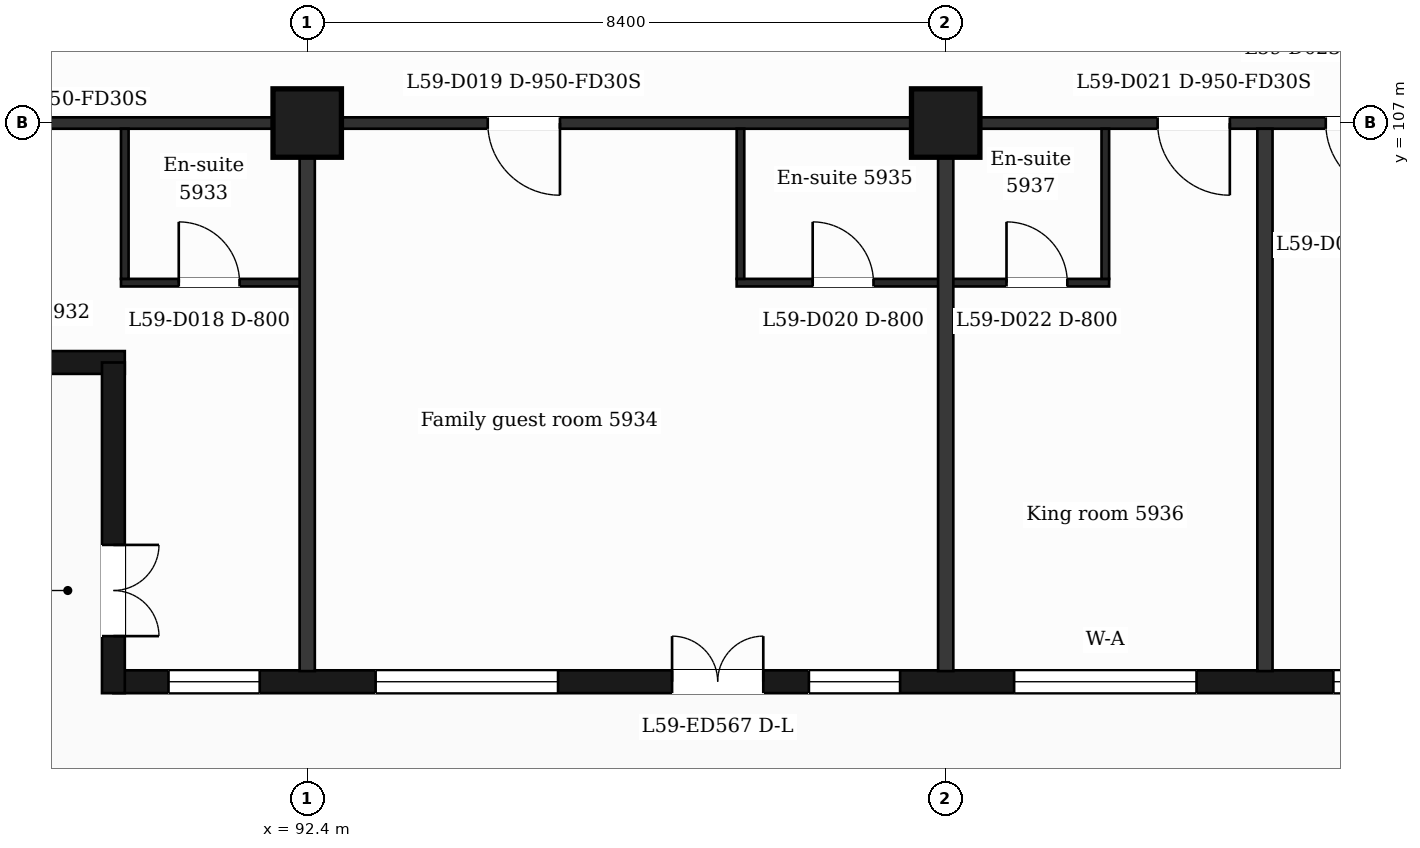
"""IFC4 building model, lengths in metres.
Left out: names, types, materials, properties, quantities, classifications, styles, units other than length and angle.
Written with IfcOpenShell. Run it as: python <this file> out.ifc"""

import sys

from ifc_helpers import new_model, si_unit, direction, frame, frame_2d, origin, origin_2d, place, context, subcontext, project, spatial, rectangle, extrude, element, fill, save


model = new_model("IFC4")
c1 = context("Model", 3, precision=1e-05, world=origin(), true_north=direction((0.0, 1.0)))
c2 = subcontext(c1, "Body", "Model", "MODEL_VIEW")
j1 = project(units=[si_unit("LENGTHUNIT", "METRE"), si_unit("PLANEANGLEUNIT", "RADIAN")], contexts=[c1])
p1 = place(None, origin())
s1 = spatial("IfcSite", under=j1, at=p1, CompositionType="ELEMENT")
p2 = place(p1, origin())
s2 = spatial("IfcBuilding", under=s1, at=p2, CompositionType="ELEMENT")
p3 = place(p2, frame((0.0, 0.0, 242.9)))
s3 = spatial("IfcBuildingStorey", under=s2, at=p3, CompositionType="ELEMENT", Elevation=242.9)
for number, where, z_axis, x_axis in (
    (1, (92.4, 107.0, 0.0), (0.0, 0.0, 1.0), (1.0, 0.0, 0.0)),
    (2, (100.8, 107.0, 0.0), (0.0, 0.0, 1.0), (1.0, 0.0, 0.0)),
):
    element("IfcColumn", number, at=place(p3, frame(where, z_axis=z_axis, x_axis=x_axis)), inside=s3, PredefinedType="COLUMN", context=c2, shape_type="SweptSolid", body=[
        extrude(rectangle(XDim=0.9, YDim=0.9, at=origin_2d()), origin(), (0.0, 0.0, 1.0), 3.7),
    ])
p4 = place(p3, frame((89.85, 99.65, 0.0), z_axis=(0.0, 0.0, 1.0), x_axis=(1.0, 0.0, 0.0)))
e3 = element("IfcWall", 3, at=p4, inside=s3, PredefinedType="SOLIDWALL", context=c2, shape_type="SweptSolid", body=[
    extrude(rectangle(XDim=47.25, YDim=0.3, at=frame_2d((23.625, 0.0))), origin(), (0.0, 0.0, 1.0), 3.2),
])
p5 = place(p4, frame((0.725, 0.0, 0.9)))
e4 = element("IfcOpeningElement", 4, at=p5, cuts=e3, PredefinedType="OPENING", context=c2, shape_type="SweptSolid", body=[
    extrude(rectangle(XDim=1.2, YDim=2.1, at=frame_2d((0.6, 1.05))), frame((0.0, 0.16, 0.0), z_axis=(0.0, -1.0, 0.0), x_axis=(1.0, 0.0, 0.0)), (0.0, 0.0, 1.0), 0.32),
])
p6 = place(p4, frame((3.45, 0.0, 0.9)))
e5 = element("IfcOpeningElement", 5, at=p6, cuts=e3, PredefinedType="OPENING", context=c2, shape_type="SweptSolid", body=[
    extrude(rectangle(XDim=2.4, YDim=2.1, at=frame_2d((1.2, 1.05))), frame((0.0, 0.16, 0.0), z_axis=(0.0, -1.0, 0.0), x_axis=(1.0, 0.0, 0.0)), (0.0, 0.0, 1.0), 0.32),
])
p7 = place(p4, frame((7.35, 0.0, 0.0)))
e6 = element("IfcOpeningElement", 6, at=p7, cuts=e3, PredefinedType="OPENING", context=c2, shape_type="SweptSolid", body=[
    extrude(rectangle(XDim=1.2, YDim=2.4, at=frame_2d((0.6, 1.2))), frame((0.0, 0.16, 0.0), z_axis=(0.0, -1.0, 0.0), x_axis=(1.0, 0.0, 0.0)), (0.0, 0.0, 1.0), 0.32),
])
p8 = place(p4, frame((9.15, 0.0, 0.9)))
e7 = element("IfcOpeningElement", 7, at=p8, cuts=e3, PredefinedType="OPENING", context=c2, shape_type="SweptSolid", body=[
    extrude(rectangle(XDim=1.2, YDim=2.1, at=frame_2d((0.6, 1.05))), frame((0.0, 0.16, 0.0), z_axis=(0.0, -1.0, 0.0), x_axis=(1.0, 0.0, 0.0)), (0.0, 0.0, 1.0), 0.32),
])
p9 = place(p4, frame((11.85, 0.0, 0.9)))
e8 = element("IfcOpeningElement", 8, at=p9, cuts=e3, PredefinedType="OPENING", context=c2, shape_type="SweptSolid", body=[
    extrude(rectangle(XDim=2.4, YDim=2.1, at=frame_2d((1.2, 1.05))), frame((0.0, 0.16, 0.0), z_axis=(0.0, -1.0, 0.0), x_axis=(1.0, 0.0, 0.0)), (0.0, 0.0, 1.0), 0.32),
])
p10 = place(p4, frame((16.05, 0.0, 0.9)))
e9 = element("IfcOpeningElement", 9, at=p10, cuts=e3, PredefinedType="OPENING", context=c2, shape_type="SweptSolid", body=[
    extrude(rectangle(XDim=2.4, YDim=2.1, at=frame_2d((1.2, 1.05))), frame((0.0, 0.16, 0.0), z_axis=(0.0, -1.0, 0.0), x_axis=(1.0, 0.0, 0.0)), (0.0, 0.0, 1.0), 0.32),
])
p11 = place(p4, frame((20.85, 0.0, 0.9)))
e10 = element("IfcOpeningElement", 10, at=p11, cuts=e3, PredefinedType="OPENING", context=c2, shape_type="SweptSolid", body=[
    extrude(rectangle(XDim=1.2, YDim=2.1, at=frame_2d((0.6, 1.05))), frame((0.0, 0.16, 0.0), z_axis=(0.0, -1.0, 0.0), x_axis=(1.0, 0.0, 0.0)), (0.0, 0.0, 1.0), 0.32),
])
p12 = place(p4, frame((25.05, 0.0, 0.9)))
e11 = element("IfcOpeningElement", 11, at=p12, cuts=e3, PredefinedType="OPENING", context=c2, shape_type="SweptSolid", body=[
    extrude(rectangle(XDim=1.2, YDim=2.1, at=frame_2d((0.6, 1.05))), frame((0.0, 0.16, 0.0), z_axis=(0.0, -1.0, 0.0), x_axis=(1.0, 0.0, 0.0)), (0.0, 0.0, 1.0), 0.32),
])
p13 = place(p4, frame((28.65, 0.0, 0.9)))
e12 = element("IfcOpeningElement", 12, at=p13, cuts=e3, PredefinedType="OPENING", context=c2, shape_type="SweptSolid", body=[
    extrude(rectangle(XDim=2.4, YDim=2.1, at=frame_2d((1.2, 1.05))), frame((0.0, 0.16, 0.0), z_axis=(0.0, -1.0, 0.0), x_axis=(1.0, 0.0, 0.0)), (0.0, 0.0, 1.0), 0.32),
])
p14 = place(p4, frame((32.85, 0.0, 0.9)))
e13 = element("IfcOpeningElement", 13, at=p14, cuts=e3, PredefinedType="OPENING", context=c2, shape_type="SweptSolid", body=[
    extrude(rectangle(XDim=2.4, YDim=2.1, at=frame_2d((1.2, 1.05))), frame((0.0, 0.16, 0.0), z_axis=(0.0, -1.0, 0.0), x_axis=(1.0, 0.0, 0.0)), (0.0, 0.0, 1.0), 0.32),
])
p15 = place(p4, frame((37.05, 0.0, 0.9)))
e14 = element("IfcOpeningElement", 14, at=p15, cuts=e3, PredefinedType="OPENING", context=c2, shape_type="SweptSolid", body=[
    extrude(rectangle(XDim=2.4, YDim=2.1, at=frame_2d((1.2, 1.05))), frame((0.0, 0.16, 0.0), z_axis=(0.0, -1.0, 0.0), x_axis=(1.0, 0.0, 0.0)), (0.0, 0.0, 1.0), 0.32),
])
p16 = place(p4, frame((41.25, 0.0, 0.9)))
e15 = element("IfcOpeningElement", 15, at=p16, cuts=e3, PredefinedType="OPENING", context=c2, shape_type="SweptSolid", body=[
    extrude(rectangle(XDim=2.4, YDim=2.1, at=frame_2d((1.2, 1.05))), frame((0.0, 0.16, 0.0), z_axis=(0.0, -1.0, 0.0), x_axis=(1.0, 0.0, 0.0)), (0.0, 0.0, 1.0), 0.32),
])
p17 = place(p4, frame((45.25, 0.0, 0.9)))
e16 = element("IfcOpeningElement", 16, at=p17, cuts=e3, PredefinedType="OPENING", context=c2, shape_type="SweptSolid", body=[
    extrude(rectangle(XDim=1.2, YDim=2.1, at=frame_2d((0.6, 1.05))), frame((0.0, 0.16, 0.0), z_axis=(0.0, -1.0, 0.0), x_axis=(1.0, 0.0, 0.0)), (0.0, 0.0, 1.0), 0.32),
])
p18 = place(p3, frame((86.452, 103.85, 0.0), z_axis=(0.0, 0.0, 1.0), x_axis=(1.0, 0.0, 0.0)))
e17 = element("IfcWall", 17, at=p18, inside=s3, PredefinedType="SOLIDWALL", context=c2, shape_type="SweptSolid", body=[
    extrude(rectangle(XDim=3.548, YDim=0.3, at=frame_2d((1.774, 0.0))), origin(), (0.0, 0.0, 1.0), 3.2),
])
p19 = place(p3, frame((89.85, 103.85, 0.0), z_axis=(0.0, 0.0, 1.0), x_axis=(0.0, -1.0, 0.0)))
e18 = element("IfcWall", 18, at=p19, inside=s3, PredefinedType="SOLIDWALL", context=c2, shape_type="SweptSolid", body=[
    extrude(rectangle(XDim=4.35, YDim=0.3, at=frame_2d((2.175, 0.0))), origin(), (0.0, 0.0, 1.0), 3.2),
])
p20 = place(p19, frame((2.4, 0.0, 0.0)))
e19 = element("IfcOpeningElement", 19, at=p20, cuts=e18, PredefinedType="OPENING", context=c2, shape_type="SweptSolid", body=[
    extrude(rectangle(XDim=1.2, YDim=2.4, at=frame_2d((0.6, 1.2))), frame((0.0, 0.16, 0.0), z_axis=(0.0, -1.0, 0.0), x_axis=(1.0, 0.0, 0.0)), (0.0, 0.0, 1.0), 0.32),
])
p21 = place(p3, frame((89.95, 104.9, 0.0), z_axis=(0.0, 0.0, 1.0), x_axis=(1.0, 0.0, 0.0)))
e20 = element("IfcWall", 20, at=p21, inside=s3, PredefinedType="PARTITIONING", context=c2, shape_type="SweptSolid", body=[
    extrude(rectangle(XDim=2.45, YDim=0.1, at=frame_2d((1.225, 0.0))), origin(), (0.0, 0.0, 1.0), 3.2),
])
p22 = place(p21, frame((0.76, 0.0, 0.0)))
e21 = element("IfcOpeningElement", 21, at=p22, cuts=e20, PredefinedType="OPENING", context=c2, shape_type="SweptSolid", body=[
    extrude(rectangle(XDim=0.8, YDim=2.1, at=frame_2d((0.4, 1.05))), frame((0.0, 0.06, 0.0), z_axis=(0.0, -1.0, 0.0), x_axis=(1.0, 0.0, 0.0)), (0.0, 0.0, 1.0), 0.12),
])
p23 = place(p3, frame((98.05, 104.9, 0.0), z_axis=(0.0, 0.0, 1.0), x_axis=(1.0, 0.0, 0.0)))
e22 = element("IfcWall", 22, at=p23, inside=s3, PredefinedType="PARTITIONING", context=c2, shape_type="SweptSolid", body=[
    extrude(rectangle(XDim=4.9, YDim=0.1, at=frame_2d((2.45, 0.0))), origin(), (0.0, 0.0, 1.0), 3.2),
])
p24 = place(p23, frame((1.0, 0.0, 0.0)))
e23 = element("IfcOpeningElement", 23, at=p24, cuts=e22, PredefinedType="OPENING", context=c2, shape_type="SweptSolid", body=[
    extrude(rectangle(XDim=0.8, YDim=2.1, at=frame_2d((0.4, 1.05))), frame((0.0, 0.06, 0.0), z_axis=(0.0, -1.0, 0.0), x_axis=(1.0, 0.0, 0.0)), (0.0, 0.0, 1.0), 0.12),
])
p25 = place(p23, frame((3.55, 0.0, 0.0)))
e24 = element("IfcOpeningElement", 24, at=p25, cuts=e22, PredefinedType="OPENING", context=c2, shape_type="SweptSolid", body=[
    extrude(rectangle(XDim=0.8, YDim=2.1, at=frame_2d((0.4, 1.05))), frame((0.0, 0.06, 0.0), z_axis=(0.0, -1.0, 0.0), x_axis=(1.0, 0.0, 0.0)), (0.0, 0.0, 1.0), 0.12),
])
p26 = place(p3, frame((87.018, 107.0, 0.0), z_axis=(0.0, 0.0, 1.0), x_axis=(1.0, 0.0, 0.0)))
e25 = element("IfcWall", 25, at=p26, inside=s3, PredefinedType="PARTITIONING", context=c2, shape_type="SweptSolid", body=[
    extrude(rectangle(XDim=52.765, YDim=0.15, at=frame_2d((26.382, 0.0))), origin(), (0.0, 0.0, 1.0), 3.2),
])
p27 = place(p26, frame((0.87, 0.0, 0.0)))
e26 = element("IfcOpeningElement", 26, at=p27, cuts=e25, PredefinedType="OPENING", context=c2, shape_type="SweptSolid", body=[
    extrude(rectangle(XDim=0.95, YDim=2.1, at=frame_2d((0.475, 1.05))), frame((0.0, 0.085, 0.0), z_axis=(0.0, -1.0, 0.0), x_axis=(1.0, 0.0, 0.0)), (0.0, 0.0, 1.0), 0.17),
])
p28 = place(p26, frame((7.757, 0.0, 0.0)))
e27 = element("IfcOpeningElement", 27, at=p28, cuts=e25, PredefinedType="OPENING", context=c2, shape_type="SweptSolid", body=[
    extrude(rectangle(XDim=0.95, YDim=2.1, at=frame_2d((0.475, 1.05))), frame((0.0, 0.085, 0.0), z_axis=(0.0, -1.0, 0.0), x_axis=(1.0, 0.0, 0.0)), (0.0, 0.0, 1.0), 0.17),
])
p29 = place(p26, frame((16.57, 0.0, 0.0)))
e28 = element("IfcOpeningElement", 28, at=p29, cuts=e25, PredefinedType="OPENING", context=c2, shape_type="SweptSolid", body=[
    extrude(rectangle(XDim=0.95, YDim=2.1, at=frame_2d((0.475, 1.05))), frame((0.0, 0.085, 0.0), z_axis=(0.0, -1.0, 0.0), x_axis=(1.0, 0.0, 0.0)), (0.0, 0.0, 1.0), 0.17),
])
p30 = place(p26, frame((18.782, 0.0, 0.0)))
e29 = element("IfcOpeningElement", 29, at=p30, cuts=e25, PredefinedType="OPENING", context=c2, shape_type="SweptSolid", body=[
    extrude(rectangle(XDim=0.95, YDim=2.1, at=frame_2d((0.475, 1.05))), frame((0.0, 0.085, 0.0), z_axis=(0.0, -1.0, 0.0), x_axis=(1.0, 0.0, 0.0)), (0.0, 0.0, 1.0), 0.17),
])
p31 = place(p26, frame((24.519, 0.0, 0.0)))
e30 = element("IfcOpeningElement", 30, at=p31, cuts=e25, PredefinedType="OPENING", context=c2, shape_type="SweptSolid", body=[
    extrude(rectangle(XDim=0.95, YDim=2.1, at=frame_2d((0.475, 1.05))), frame((0.0, 0.085, 0.0), z_axis=(0.0, -1.0, 0.0), x_axis=(1.0, 0.0, 0.0)), (0.0, 0.0, 1.0), 0.17),
])
p32 = place(p26, frame((26.919, 0.0, 0.0)))
e31 = element("IfcOpeningElement", 31, at=p32, cuts=e25, PredefinedType="OPENING", context=c2, shape_type="SweptSolid", body=[
    extrude(rectangle(XDim=0.95, YDim=2.1, at=frame_2d((0.475, 1.05))), frame((0.0, 0.085, 0.0), z_axis=(0.0, -1.0, 0.0), x_axis=(1.0, 0.0, 0.0)), (0.0, 0.0, 1.0), 0.17),
])
p33 = place(p26, frame((33.557, 0.0, 0.0)))
e32 = element("IfcOpeningElement", 32, at=p33, cuts=e25, PredefinedType="OPENING", context=c2, shape_type="SweptSolid", body=[
    extrude(rectangle(XDim=0.95, YDim=2.1, at=frame_2d((0.475, 1.05))), frame((0.0, 0.085, 0.0), z_axis=(0.0, -1.0, 0.0), x_axis=(1.0, 0.0, 0.0)), (0.0, 0.0, 1.0), 0.17),
])
p34 = place(p26, frame((40.157, 0.0, 0.0)))
e33 = element("IfcOpeningElement", 33, at=p34, cuts=e25, PredefinedType="OPENING", context=c2, shape_type="SweptSolid", body=[
    extrude(rectangle(XDim=1.0, YDim=2.1, at=frame_2d((0.5, 1.05))), frame((0.0, 0.085, 0.0), z_axis=(0.0, -1.0, 0.0), x_axis=(1.0, 0.0, 0.0)), (0.0, 0.0, 1.0), 0.17),
])
p35 = place(p26, frame((48.767, 0.0, 0.0)))
e34 = element("IfcOpeningElement", 34, at=p35, cuts=e25, PredefinedType="OPENING", context=c2, shape_type="SweptSolid", body=[
    extrude(rectangle(XDim=0.95, YDim=2.1, at=frame_2d((0.475, 1.05))), frame((0.0, 0.085, 0.0), z_axis=(0.0, -1.0, 0.0), x_axis=(1.0, 0.0, 0.0)), (0.0, 0.0, 1.0), 0.17),
])
p36 = place(p3, frame((90.0, 104.95, 0.0), z_axis=(0.0, 0.0, 1.0), x_axis=(0.0, 1.0, 0.0)))
e35 = element("IfcWall", 35, at=p36, inside=s3, PredefinedType="PARTITIONING", context=c2, shape_type="SweptSolid", body=[
    extrude(rectangle(XDim=1.975, YDim=0.1, at=frame_2d((0.988, 0.0))), origin(), (0.0, 0.0, 1.0), 3.2),
])
p37 = place(p3, frame((92.4, 99.79, 0.0), z_axis=(0.0, 0.0, 1.0), x_axis=(0.0, 1.0, 0.0)))
e36 = element("IfcWall", 36, at=p37, inside=s3, PredefinedType="PARTITIONING", context=c2, shape_type="SweptSolid", body=[
    extrude(rectangle(XDim=7.135, YDim=0.2, at=frame_2d((3.567, 0.0))), origin(), (0.0, 0.0, 1.0), 3.2),
])
p38 = place(p3, frame((98.1, 104.95, 0.0), z_axis=(0.0, 0.0, 1.0), x_axis=(0.0, 1.0, 0.0)))
e37 = element("IfcWall", 37, at=p38, inside=s3, PredefinedType="PARTITIONING", context=c2, shape_type="SweptSolid", body=[
    extrude(rectangle(XDim=1.975, YDim=0.1, at=frame_2d((0.988, 0.0))), origin(), (0.0, 0.0, 1.0), 3.2),
])
p39 = place(p3, frame((100.8, 99.79, 0.0), z_axis=(0.0, 0.0, 1.0), x_axis=(0.0, 1.0, 0.0)))
e38 = element("IfcWall", 38, at=p39, inside=s3, PredefinedType="PARTITIONING", context=c2, shape_type="SweptSolid", body=[
    extrude(rectangle(XDim=7.135, YDim=0.2, at=frame_2d((3.567, 0.0))), origin(), (0.0, 0.0, 1.0), 3.2),
])
p40 = place(p3, frame((102.9, 104.95, 0.0), z_axis=(0.0, 0.0, 1.0), x_axis=(0.0, 1.0, 0.0)))
e39 = element("IfcWall", 39, at=p40, inside=s3, PredefinedType="PARTITIONING", context=c2, shape_type="SweptSolid", body=[
    extrude(rectangle(XDim=1.975, YDim=0.1, at=frame_2d((0.988, 0.0))), origin(), (0.0, 0.0, 1.0), 3.2),
])
p41 = place(p3, frame((105.0, 99.79, 0.0), z_axis=(0.0, 0.0, 1.0), x_axis=(0.0, 1.0, 0.0)))
e40 = element("IfcWall", 40, at=p41, inside=s3, PredefinedType="PARTITIONING", context=c2, shape_type="SweptSolid", body=[
    extrude(rectangle(XDim=7.135, YDim=0.2, at=frame_2d((3.567, 0.0))), origin(), (0.0, 0.0, 1.0), 3.2),
])
p42 = place(p5, origin())
e41 = element("IfcWindow", 41, at=p42, inside=s3, PartitioningType="SINGLE_PANEL", PredefinedType="WINDOW", context=c2, shape_type="SweptSolid", body=[
    extrude(rectangle(XDim=1.2, YDim=2.1, at=frame_2d((0.6, 1.05))), frame((0.0, 0.03, 0.0), z_axis=(0.0, -1.0, 0.0), x_axis=(1.0, 0.0, 0.0)), (0.0, 0.0, 1.0), 0.06),
])
fill(e4, e41)
p43 = place(p6, origin())
e42 = element("IfcWindow", 42, at=p43, inside=s3, PartitioningType="SINGLE_PANEL", PredefinedType="WINDOW", context=c2, shape_type="SweptSolid", body=[
    extrude(rectangle(XDim=2.4, YDim=2.1, at=frame_2d((1.2, 1.05))), frame((0.0, 0.03, 0.0), z_axis=(0.0, -1.0, 0.0), x_axis=(1.0, 0.0, 0.0)), (0.0, 0.0, 1.0), 0.06),
])
fill(e5, e42)
p44 = place(p7, origin())
e43 = element("IfcDoor", 43, at=p44, inside=s3, OperationType="DOUBLE_DOOR_SINGLE_SWING", PredefinedType="DOOR", context=c2, shape_type="SweptSolid", body=[
    extrude(rectangle(XDim=1.2, YDim=2.4, at=frame_2d((0.6, 1.2))), frame((0.0, 0.025, 0.0), z_axis=(0.0, -1.0, 0.0), x_axis=(1.0, 0.0, 0.0)), (0.0, 0.0, 1.0), 0.05),
])
fill(e6, e43)
p45 = place(p8, origin())
e44 = element("IfcWindow", 44, at=p45, inside=s3, PartitioningType="SINGLE_PANEL", PredefinedType="WINDOW", context=c2, shape_type="SweptSolid", body=[
    extrude(rectangle(XDim=1.2, YDim=2.1, at=frame_2d((0.6, 1.05))), frame((0.0, 0.03, 0.0), z_axis=(0.0, -1.0, 0.0), x_axis=(1.0, 0.0, 0.0)), (0.0, 0.0, 1.0), 0.06),
])
fill(e7, e44)
p46 = place(p9, origin())
e45 = element("IfcWindow", 45, at=p46, inside=s3, PartitioningType="SINGLE_PANEL", PredefinedType="WINDOW", context=c2, shape_type="SweptSolid", body=[
    extrude(rectangle(XDim=2.4, YDim=2.1, at=frame_2d((1.2, 1.05))), frame((0.0, 0.03, 0.0), z_axis=(0.0, -1.0, 0.0), x_axis=(1.0, 0.0, 0.0)), (0.0, 0.0, 1.0), 0.06),
])
fill(e8, e45)
p47 = place(p10, origin())
e46 = element("IfcWindow", 46, at=p47, inside=s3, PartitioningType="SINGLE_PANEL", PredefinedType="WINDOW", context=c2, shape_type="SweptSolid", body=[
    extrude(rectangle(XDim=2.4, YDim=2.1, at=frame_2d((1.2, 1.05))), frame((0.0, 0.03, 0.0), z_axis=(0.0, -1.0, 0.0), x_axis=(1.0, 0.0, 0.0)), (0.0, 0.0, 1.0), 0.06),
])
fill(e9, e46)
p48 = place(p20, origin())
e47 = element("IfcDoor", 47, at=p48, inside=s3, OperationType="DOUBLE_DOOR_SINGLE_SWING", PredefinedType="DOOR", context=c2, shape_type="SweptSolid", body=[
    extrude(rectangle(XDim=1.2, YDim=2.4, at=frame_2d((0.6, 1.2))), frame((0.0, 0.025, 0.0), z_axis=(0.0, -1.0, 0.0), x_axis=(1.0, 0.0, 0.0)), (0.0, 0.0, 1.0), 0.05),
])
fill(e19, e47)
p49 = place(p22, origin())
e48 = element("IfcDoor", 48, at=p49, inside=s3, OperationType="SINGLE_SWING_LEFT", PredefinedType="DOOR", context=c2, shape_type="SweptSolid", body=[
    extrude(rectangle(XDim=0.8, YDim=2.1, at=frame_2d((0.4, 1.05))), frame((0.0, 0.025, 0.0), z_axis=(0.0, -1.0, 0.0), x_axis=(1.0, 0.0, 0.0)), (0.0, 0.0, 1.0), 0.05),
])
fill(e21, e48)
p50 = place(p28, origin())
e49 = element("IfcDoor", 49, at=p50, inside=s3, OperationType="SINGLE_SWING_RIGHT", PredefinedType="DOOR", context=c2, shape_type="SweptSolid", body=[
    extrude(rectangle(XDim=0.95, YDim=2.1, at=frame_2d((0.475, 1.05))), frame((0.0, 0.025, 0.0), z_axis=(0.0, -1.0, 0.0), x_axis=(1.0, 0.0, 0.0)), (0.0, 0.0, 1.0), 0.05),
])
fill(e27, e49)
p51 = place(p24, origin())
e50 = element("IfcDoor", 50, at=p51, inside=s3, OperationType="SINGLE_SWING_LEFT", PredefinedType="DOOR", context=c2, shape_type="SweptSolid", body=[
    extrude(rectangle(XDim=0.8, YDim=2.1, at=frame_2d((0.4, 1.05))), frame((0.0, 0.025, 0.0), z_axis=(0.0, -1.0, 0.0), x_axis=(1.0, 0.0, 0.0)), (0.0, 0.0, 1.0), 0.05),
])
fill(e23, e50)
p52 = place(p29, origin())
e51 = element("IfcDoor", 51, at=p52, inside=s3, OperationType="SINGLE_SWING_RIGHT", PredefinedType="DOOR", context=c2, shape_type="SweptSolid", body=[
    extrude(rectangle(XDim=0.95, YDim=2.1, at=frame_2d((0.475, 1.05))), frame((0.0, 0.025, 0.0), z_axis=(0.0, -1.0, 0.0), x_axis=(1.0, 0.0, 0.0)), (0.0, 0.0, 1.0), 0.05),
])
fill(e28, e51)
p53 = place(p25, origin())
e52 = element("IfcDoor", 52, at=p53, inside=s3, OperationType="SINGLE_SWING_LEFT", PredefinedType="DOOR", context=c2, shape_type="SweptSolid", body=[
    extrude(rectangle(XDim=0.8, YDim=2.1, at=frame_2d((0.4, 1.05))), frame((0.0, 0.025, 0.0), z_axis=(0.0, -1.0, 0.0), x_axis=(1.0, 0.0, 0.0)), (0.0, 0.0, 1.0), 0.05),
])
fill(e24, e52)
p54 = place(p30, origin())
e53 = element("IfcDoor", 53, at=p54, inside=s3, OperationType="SINGLE_SWING_RIGHT", PredefinedType="DOOR", context=c2, shape_type="SweptSolid", body=[
    extrude(rectangle(XDim=0.95, YDim=2.1, at=frame_2d((0.475, 1.05))), frame((0.0, 0.025, 0.0), z_axis=(0.0, -1.0, 0.0), x_axis=(1.0, 0.0, 0.0)), (0.0, 0.0, 1.0), 0.05),
])
fill(e29, e53)
save(model, sys.argv[1])
